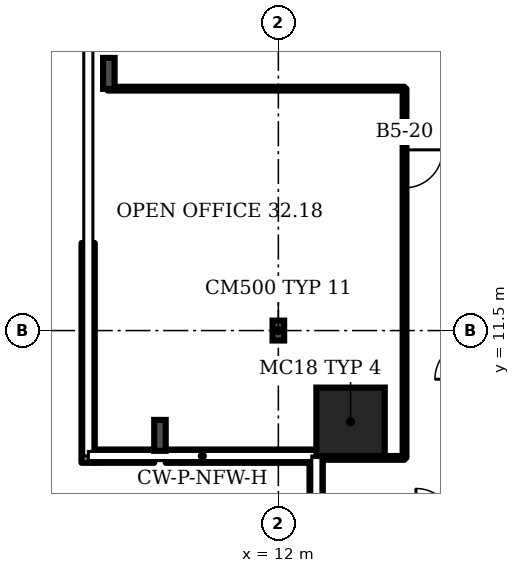
"""IFC4 building model, lengths in metres.
Left out: names, types, materials, properties, quantities, classifications, styles, units other than length and angle.
Written with IfcOpenShell. Run it as: python <this file> out.ifc"""

import sys

from ifc_helpers import new_model, si_unit, direction, frame, frame_2d, origin, origin_2d, place, context, subcontext, project, spatial, rectangle, i_section, extrude, element, fill, save


model = new_model("IFC4")
c1 = context("Model", 3, precision=1e-05, world=origin(), true_north=direction((0.0, 1.0)))
c2 = subcontext(c1, "Body", "Model", "MODEL_VIEW")
j1 = project(units=[si_unit("LENGTHUNIT", "METRE"), si_unit("PLANEANGLEUNIT", "RADIAN")], contexts=[c1])
p1 = place(None, origin())
s1 = spatial("IfcSite", under=j1, at=p1, CompositionType="ELEMENT")
p2 = place(p1, origin())
s2 = spatial("IfcBuilding", under=s1, at=p2, CompositionType="ELEMENT")
p3 = place(p2, frame((0.0, 0.0, 136.3)))
s3 = spatial("IfcBuildingStorey", under=s2, at=p3, CompositionType="ELEMENT", Elevation=136.3)
p4 = place(p3, frame((13.9, 9.1, 0.0), z_axis=(0.0, 0.0, 1.0), x_axis=(1.0, 0.0, 0.0)))
e1 = element("IfcColumn", 1, at=p4, inside=s3, PredefinedType="COLUMN", context=c2, shape_type="SweptSolid", body=[
    extrude(rectangle(XDim=1.8, YDim=1.8, at=origin_2d()), origin(), (0.0, 0.0, 1.0), 3.6),
])
for number, where, z_axis, x_axis in (
    (2, (7.54, 18.267, 0.0), (0.0, 0.0, 1.0), (-1.0, 0.0, 0.0)),
    (3, (8.885, 8.743, 0.0), (0.0, 0.0, 1.0), (-1.0, 0.0, 0.0)),
):
    element("IfcColumn", number, at=place(p3, frame(where, z_axis=z_axis, x_axis=x_axis)), inside=s3, PredefinedType="COLUMN", context=c2, shape_type="SweptSolid", body=[
        extrude(i_section(OverallWidth=0.303, OverallDepth=0.814, WebThickness=0.021, FlangeThickness=0.04, FilletRadius=0.03, at=origin_2d()), origin(), (0.0, 0.0, 1.0), 3.6),
    ])
p5 = place(p3, frame((12.0, 11.5, 0.0), z_axis=(0.0, 0.0, 1.0), x_axis=(1.0, 0.0, 0.0)))
e4 = element("IfcColumn", 4, at=p5, inside=s3, PredefinedType="COLUMN", context=c2, shape_type="SweptSolid", body=[
    extrude(i_section(OverallWidth=0.306, OverallDepth=0.524, WebThickness=0.021, FlangeThickness=0.04, FilletRadius=0.027, at=origin_2d()), origin(), (0.0, 0.0, 1.0), 3.6),
])
p6 = place(p3, frame((6.995, 13.803, 0.0), z_axis=(0.0, 0.0, 1.0), x_axis=(0.0, -1.0, 0.0)))
e5 = element("IfcWall", 5, at=p6, inside=s3, PredefinedType="SOLIDWALL", context=c2, shape_type="SweptSolid", body=[
    extrude(rectangle(XDim=5.783, YDim=0.35, at=frame_2d((2.892, 0.0))), origin(), (0.0, 0.0, 1.0), 1.0),
])
p7 = place(p3, frame((7.17, 8.195, 0.0), z_axis=(0.0, 0.0, 1.0), x_axis=(1.0, 0.0, 0.0)))
e6 = element("IfcWall", 6, at=p7, inside=s3, PredefinedType="SOLIDWALL", context=c2, shape_type="SweptSolid", body=[
    extrude(rectangle(XDim=1.563, YDim=0.35, at=frame_2d((0.782, 0.0))), origin(), (0.0, 0.0, 1.0), 1.0),
])
p8 = place(p3, frame((9.036, 8.195, 0.0), z_axis=(0.0, 0.0, 1.0), x_axis=(1.0, 0.0, 0.0)))
e7 = element("IfcWall", 7, at=p8, inside=s3, PredefinedType="SOLIDWALL", context=c2, shape_type="SweptSolid", body=[
    extrude(rectangle(XDim=3.964, YDim=0.35, at=frame_2d((1.982, 0.0))), origin(), (0.0, 0.0, 1.0), 1.0),
])
p9 = place(p3, frame((12.995, 8.02, 0.0), z_axis=(0.0, 0.0, 1.0), x_axis=(0.0, -1.0, 0.0)))
e8 = element("IfcWall", 8, at=p9, inside=s3, PredefinedType="SOLIDWALL", context=c2, shape_type="SweptSolid", body=[
    extrude(rectangle(XDim=6.161, YDim=0.35, at=frame_2d((3.081, 0.0))), origin(), (0.0, 0.0, 1.0), 1.0),
])
p10 = place(p3, frame((7.51, 17.865, 0.0), z_axis=(0.0, 0.0, 1.0), x_axis=(1.0, 0.0, 0.0)))
e9 = element("IfcWall", 9, at=p10, inside=s3, PredefinedType="PARTITIONING", context=c2, shape_type="SweptSolid", body=[
    extrude(rectangle(XDim=7.81, YDim=0.1, at=frame_2d((3.905, 0.0))), origin(), (0.0, 0.0, 1.0), 3.2),
])
p11 = place(p3, frame((13.02, 8.15, 0.0), z_axis=(0.0, 0.0, 1.0), x_axis=(1.0, 0.0, 0.0)))
e10 = element("IfcWall", 10, at=p11, inside=s3, PredefinedType="PARTITIONING", context=c2, shape_type="SweptSolid", body=[
    extrude(rectangle(XDim=2.3, YDim=0.1, at=frame_2d((1.15, 0.0))), origin(), (0.0, 0.0, 1.0), 3.2),
])
p12 = place(p3, frame((15.32, 8.15, 0.0), z_axis=(0.0, 0.0, 1.0), x_axis=(0.0, 1.0, 0.0)))
e11 = element("IfcWall", 11, at=p12, inside=s3, PredefinedType="PARTITIONING", context=c2, shape_type="SweptSolid", body=[
    extrude(rectangle(XDim=9.715, YDim=0.1, at=frame_2d((4.857, 0.0))), origin(), (0.0, 0.0, 1.0), 3.2),
])
p13 = place(p12, frame((7.105, 0.0, 0.0)))
e12 = element("IfcOpeningElement", 12, at=p13, cuts=e11, PredefinedType="OPENING", context=c2, shape_type="SweptSolid", body=[
    extrude(rectangle(XDim=1.0, YDim=2.1, at=frame_2d((0.5, 1.05))), frame((0.0, 0.06, 0.0), z_axis=(0.0, -1.0, 0.0), x_axis=(1.0, 0.0, 0.0)), (0.0, 0.0, 1.0), 0.12),
])
p14 = place(p13, origin())
e13 = element("IfcDoor", 13, at=p14, inside=s3, OperationType="SINGLE_SWING_RIGHT", PredefinedType="DOOR", context=c2, shape_type="SweptSolid", body=[
    extrude(rectangle(XDim=1.0, YDim=2.1, at=frame_2d((0.5, 1.05))), frame((0.0, 0.025, 0.0), z_axis=(0.0, -1.0, 0.0), x_axis=(1.0, 0.0, 0.0)), (0.0, 0.0, 1.0), 0.05),
])
fill(e12, e13)
save(model, sys.argv[1])
